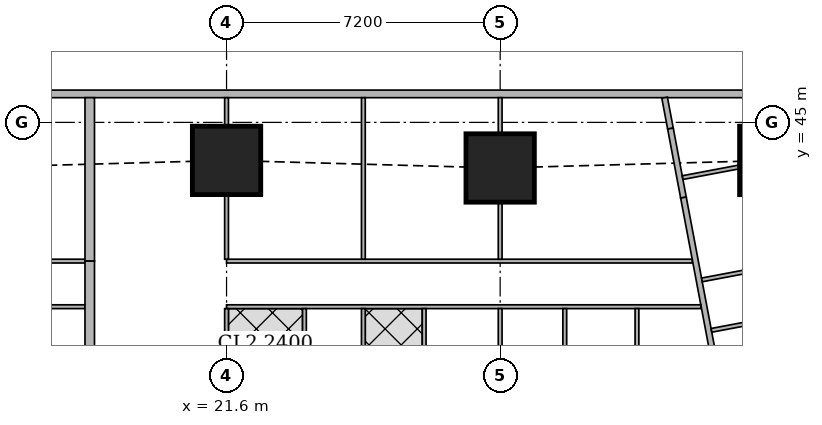
"""IFC4 building model, lengths in metres.
Left out: names, types, materials, properties, quantities, classifications, styles, units other than length and angle.
Written with IfcOpenShell. Run it as: python <this file> out.ifc"""

import sys

from ifc_helpers import new_model, si_unit, direction, frame, frame_2d, origin, origin_2d, place, context, subcontext, project, spatial, rectangle, extrude, element, fill, save


model = new_model("IFC4")
c1 = context("Model", 3, precision=1e-05, world=origin(), true_north=direction((0.0, 1.0)))
c2 = subcontext(c1, "Body", "Model", "MODEL_VIEW")
j1 = project(units=[si_unit("LENGTHUNIT", "METRE"), si_unit("PLANEANGLEUNIT", "RADIAN")], contexts=[c1])
p1 = place(None, origin())
s1 = spatial("IfcSite", under=j1, at=p1, CompositionType="ELEMENT")
p2 = place(p1, origin())
s2 = spatial("IfcBuilding", under=s1, at=p2, CompositionType="ELEMENT")
p3 = place(p2, frame((0.0, 0.0, 139.55)))
s3 = spatial("IfcBuildingStorey", under=s2, at=p3, CompositionType="ELEMENT", Elevation=139.55)
for number, where, z_axis, x_axis in (
    (1, (21.6, 44.0, 0.0), (0.0, 0.0, 1.0), (1.0, 0.0, 0.0)),
    (2, (28.8, 43.8, 0.0), (0.0, 0.0, 1.0), (1.0, 0.0, 0.0)),
    (3, (36.0, 44.0, 0.0), (0.0, 0.0, 1.0), (1.0, 0.0, 0.0)),
):
    element("IfcColumn", number, at=place(p3, frame(where, z_axis=z_axis, x_axis=x_axis)), inside=s3, PredefinedType="COLUMN", context=c2, shape_type="SweptSolid", body=[
        extrude(rectangle(XDim=1.8, YDim=1.8, at=origin_2d()), origin(), (0.0, 0.0, 1.0), 3.75),
    ])
p4 = place(p3, frame((40.106, 45.75, 0.0), z_axis=(0.0, 0.0, 1.0), x_axis=(-1.0, 0.0, 0.0)))
e4 = element("IfcWall", 4, at=p4, inside=s3, PredefinedType="SOLIDWALL", context=c2, shape_type="SweptSolid", body=[
    extrude(rectangle(XDim=37.943, YDim=0.2, at=frame_2d((18.971, 0.0))), origin(), (0.0, 0.0, 1.0), 3.5),
])
p5 = place(p4, frame((8.606, 0.0, 0.9)))
e5 = element("IfcOpeningElement", 5, at=p5, cuts=e4, PredefinedType="OPENING", context=c2, shape_type="SweptSolid", body=[
    extrude(rectangle(XDim=1.8, YDim=1.5, at=frame_2d((0.9, 0.75))), frame((0.0, 0.11, 0.0), z_axis=(0.0, -1.0, 0.0), x_axis=(1.0, 0.0, 0.0)), (0.0, 0.0, 1.0), 0.22),
])
p6 = place(p4, frame((12.206, 0.0, 0.9)))
e6 = element("IfcOpeningElement", 6, at=p6, cuts=e4, PredefinedType="OPENING", context=c2, shape_type="SweptSolid", body=[
    extrude(rectangle(XDim=1.8, YDim=1.5, at=frame_2d((0.9, 0.75))), frame((0.0, 0.11, 0.0), z_axis=(0.0, -1.0, 0.0), x_axis=(1.0, 0.0, 0.0)), (0.0, 0.0, 1.0), 0.22),
])
p7 = place(p4, frame((15.806, 0.0, 0.9)))
e7 = element("IfcOpeningElement", 7, at=p7, cuts=e4, PredefinedType="OPENING", context=c2, shape_type="SweptSolid", body=[
    extrude(rectangle(XDim=1.8, YDim=1.5, at=frame_2d((0.9, 0.75))), frame((0.0, 0.11, 0.0), z_axis=(0.0, -1.0, 0.0), x_axis=(1.0, 0.0, 0.0)), (0.0, 0.0, 1.0), 0.22),
])
p8 = place(p4, frame((19.406, 0.0, 0.9)))
e8 = element("IfcOpeningElement", 8, at=p8, cuts=e4, PredefinedType="OPENING", context=c2, shape_type="SweptSolid", body=[
    extrude(rectangle(XDim=1.8, YDim=1.5, at=frame_2d((0.9, 0.75))), frame((0.0, 0.11, 0.0), z_axis=(0.0, -1.0, 0.0), x_axis=(1.0, 0.0, 0.0)), (0.0, 0.0, 1.0), 0.22),
])
p9 = place(p4, frame((23.006, 0.0, 0.9)))
e9 = element("IfcOpeningElement", 9, at=p9, cuts=e4, PredefinedType="OPENING", context=c2, shape_type="SweptSolid", body=[
    extrude(rectangle(XDim=1.8, YDim=1.5, at=frame_2d((0.9, 0.75))), frame((0.0, 0.11, 0.0), z_axis=(0.0, -1.0, 0.0), x_axis=(1.0, 0.0, 0.0)), (0.0, 0.0, 1.0), 0.22),
])
p10 = place(p4, frame((26.606, 0.0, 0.9)))
e10 = element("IfcOpeningElement", 10, at=p10, cuts=e4, PredefinedType="OPENING", context=c2, shape_type="SweptSolid", body=[
    extrude(rectangle(XDim=1.8, YDim=1.5, at=frame_2d((0.9, 0.75))), frame((0.0, 0.11, 0.0), z_axis=(0.0, -1.0, 0.0), x_axis=(1.0, 0.0, 0.0)), (0.0, 0.0, 1.0), 0.22),
])
p11 = place(p3, frame((33.127, 45.65, 0.0), z_axis=(0.0, 0.0, 1.0), x_axis=(0.186176514576, -0.982516313056, 0.0)))
e11 = element("IfcWall", 11, at=p11, inside=s3, PredefinedType="SOLIDWALL", context=c2, shape_type="SweptSolid", body=[
    extrude(rectangle(XDim=0.827, YDim=0.15, at=frame_2d((0.414, 0.0))), origin(), (0.0, 0.0, 1.0), 3.5),
])
p12 = place(p3, frame((33.281, 44.837, 0.0), z_axis=(0.0, 0.0, 1.0), x_axis=(0.185198323004, -0.982701165745, 0.0)))
e12 = element("IfcWall", 12, at=p12, inside=s3, PredefinedType="SOLIDWALL", context=c2, shape_type="SweptSolid", body=[
    extrude(rectangle(XDim=1.847, YDim=0.15, at=frame_2d((0.923, 0.0))), origin(), (0.0, 0.0, 1.0), 2.1),
])
p13 = place(p3, frame((33.623, 43.022, 0.0), z_axis=(0.0, 0.0, 1.0), x_axis=(0.185596841028, -0.98262597798, 0.0)))
e13 = element("IfcWall", 13, at=p13, inside=s3, PredefinedType="SOLIDWALL", context=c2, shape_type="SweptSolid", body=[
    extrude(rectangle(XDim=41.66, YDim=0.15, at=frame_2d((20.83, 0.0))), origin(), (0.0, 0.0, 1.0), 2.5),
])
p14 = place(p13, frame((20.242, 0.0, 0.0)))
e14 = element("IfcOpeningElement", 14, at=p14, cuts=e13, PredefinedType="OPENING", context=c2, shape_type="SweptSolid", body=[
    extrude(rectangle(XDim=1.0, YDim=2.1, at=frame_2d((0.5, 1.05))), frame((0.0, 0.085, 0.0), z_axis=(0.0, -1.0, 0.0), x_axis=(1.0, 0.0, 0.0)), (0.0, 0.0, 1.0), 0.17),
])
p15 = place(p13, frame((24.714, 0.0, 0.0)))
e15 = element("IfcOpeningElement", 15, at=p15, cuts=e13, PredefinedType="OPENING", context=c2, shape_type="SweptSolid", body=[
    extrude(rectangle(XDim=1.0, YDim=2.1, at=frame_2d((0.5, 1.05))), frame((0.0, 0.085, 0.0), z_axis=(0.0, -1.0, 0.0), x_axis=(1.0, 0.0, 0.0)), (0.0, 0.0, 1.0), 0.17),
])
p16 = place(p13, frame((31.206, 0.0, 0.0)))
e16 = element("IfcOpeningElement", 16, at=p16, cuts=e13, PredefinedType="OPENING", context=c2, shape_type="SweptSolid", body=[
    extrude(rectangle(XDim=1.0, YDim=2.1, at=frame_2d((0.5, 1.05))), frame((0.0, 0.085, 0.0), z_axis=(0.0, -1.0, 0.0), x_axis=(1.0, 0.0, 0.0)), (0.0, 0.0, 1.0), 0.17),
])
p17 = place(p3, frame((35.09, 43.828, 0.0), z_axis=(0.0, 0.0, 1.0), x_axis=(-0.982683801717, -0.185290436461, 0.0)))
e17 = element("IfcWall", 17, at=p17, inside=s3, PredefinedType="PARTITIONING", context=c2, shape_type="SweptSolid", body=[
    extrude(rectangle(XDim=1.515, YDim=0.1, at=frame_2d((0.758, 0.0))), origin(), (0.0, 0.0, 1.0), 2.1),
])
p18 = place(p3, frame((37.824, 40.182, 0.0), z_axis=(0.0, 0.0, 1.0), x_axis=(-0.982648794755, -0.185475998897, 0.0)))
e18 = element("IfcWall", 18, at=p18, inside=s3, PredefinedType="PARTITIONING", context=c2, shape_type="SweptSolid", body=[
    extrude(rectangle(XDim=3.525, YDim=0.1, at=frame_2d((1.763, 0.0))), origin(), (0.0, 0.0, 1.0), 3.5),
])
p19 = place(p3, frame((14.4, 41.35, 0.0), z_axis=(0.0, 0.0, 1.0), x_axis=(1.0, 0.0, 0.0)))
e19 = element("IfcWall", 19, at=p19, inside=s3, PredefinedType="PARTITIONING", context=c2, shape_type="SweptSolid", body=[
    extrude(rectangle(XDim=3.475, YDim=0.1, at=frame_2d((1.738, 0.0))), origin(), (0.0, 0.0, 1.0), 3.5),
])
p20 = place(p19, frame((0.2, 0.0, 0.0)))
e20 = element("IfcOpeningElement", 20, at=p20, cuts=e19, PredefinedType="OPENING", context=c2, shape_type="SweptSolid", body=[
    extrude(rectangle(XDim=0.9, YDim=2.1, at=frame_2d((0.45, 1.05))), frame((0.0, 0.06, 0.0), z_axis=(0.0, -1.0, 0.0), x_axis=(1.0, 0.0, 0.0)), (0.0, 0.0, 1.0), 0.12),
])
p21 = place(p3, frame((14.4, 40.15, 0.0), z_axis=(0.0, 0.0, 1.0), x_axis=(1.0, 0.0, 0.0)))
e21 = element("IfcWall", 21, at=p21, inside=s3, PredefinedType="PARTITIONING", context=c2, shape_type="SweptSolid", body=[
    extrude(rectangle(XDim=3.475, YDim=0.1, at=frame_2d((1.738, 0.0))), origin(), (0.0, 0.0, 1.0), 3.5),
])
p22 = place(p21, frame((0.575, 0.0, 0.0)))
e22 = element("IfcOpeningElement", 22, at=p22, cuts=e21, PredefinedType="OPENING", context=c2, shape_type="SweptSolid", body=[
    extrude(rectangle(XDim=0.9, YDim=2.1, at=frame_2d((0.45, 1.05))), frame((0.0, 0.06, 0.0), z_axis=(0.0, -1.0, 0.0), x_axis=(1.0, 0.0, 0.0)), (0.0, 0.0, 1.0), 0.12),
])
p23 = place(p21, frame((2.375, 0.0, 0.0)))
e23 = element("IfcOpeningElement", 23, at=p23, cuts=e21, PredefinedType="OPENING", context=c2, shape_type="SweptSolid", body=[
    extrude(rectangle(XDim=0.9, YDim=2.1, at=frame_2d((0.45, 1.05))), frame((0.0, 0.06, 0.0), z_axis=(0.0, -1.0, 0.0), x_axis=(1.0, 0.0, 0.0)), (0.0, 0.0, 1.0), 0.12),
])
p24 = place(p3, frame((21.6, 41.35, 0.0), z_axis=(0.0, 0.0, 1.0), x_axis=(1.0, 0.0, 0.0)))
e24 = element("IfcWall", 24, at=p24, inside=s3, PredefinedType="PARTITIONING", context=c2, shape_type="SweptSolid", body=[
    extrude(rectangle(XDim=12.253, YDim=0.1, at=frame_2d((6.126, 0.0))), origin(), (0.0, 0.0, 1.0), 3.5),
])
p25 = place(p24, frame((0.2, 0.0, 0.0)))
e25 = element("IfcOpeningElement", 25, at=p25, cuts=e24, PredefinedType="OPENING", context=c2, shape_type="SweptSolid", body=[
    extrude(rectangle(XDim=0.9, YDim=2.1, at=frame_2d((0.45, 1.05))), frame((0.0, 0.06, 0.0), z_axis=(0.0, -1.0, 0.0), x_axis=(1.0, 0.0, 0.0)), (0.0, 0.0, 1.0), 0.12),
])
p26 = place(p24, frame((3.8, 0.0, 0.0)))
e26 = element("IfcOpeningElement", 26, at=p26, cuts=e24, PredefinedType="OPENING", context=c2, shape_type="SweptSolid", body=[
    extrude(rectangle(XDim=0.9, YDim=2.1, at=frame_2d((0.45, 1.05))), frame((0.0, 0.06, 0.0), z_axis=(0.0, -1.0, 0.0), x_axis=(1.0, 0.0, 0.0)), (0.0, 0.0, 1.0), 0.12),
])
p27 = place(p24, frame((7.4, 0.0, 0.0)))
e27 = element("IfcOpeningElement", 27, at=p27, cuts=e24, PredefinedType="OPENING", context=c2, shape_type="SweptSolid", body=[
    extrude(rectangle(XDim=0.9, YDim=2.1, at=frame_2d((0.45, 1.05))), frame((0.0, 0.06, 0.0), z_axis=(0.0, -1.0, 0.0), x_axis=(1.0, 0.0, 0.0)), (0.0, 0.0, 1.0), 0.12),
])
p28 = place(p3, frame((21.6, 40.15, 0.0), z_axis=(0.0, 0.0, 1.0), x_axis=(1.0, 0.0, 0.0)))
e28 = element("IfcWall", 28, at=p28, inside=s3, PredefinedType="PARTITIONING", context=c2, shape_type="SweptSolid", body=[
    extrude(rectangle(XDim=12.48, YDim=0.1, at=frame_2d((6.24, 0.0))), origin(), (0.0, 0.0, 1.0), 3.5),
])
p29 = place(p28, frame((0.575, 0.0, 0.0)))
e29 = element("IfcOpeningElement", 29, at=p29, cuts=e28, PredefinedType="OPENING", context=c2, shape_type="SweptSolid", body=[
    extrude(rectangle(XDim=0.9, YDim=2.1, at=frame_2d((0.45, 1.05))), frame((0.0, 0.06, 0.0), z_axis=(0.0, -1.0, 0.0), x_axis=(1.0, 0.0, 0.0)), (0.0, 0.0, 1.0), 0.12),
])
p30 = place(p28, frame((3.95, 0.0, 0.0)))
e30 = element("IfcOpeningElement", 30, at=p30, cuts=e28, PredefinedType="OPENING", context=c2, shape_type="SweptSolid", body=[
    extrude(rectangle(XDim=0.9, YDim=2.1, at=frame_2d((0.45, 1.05))), frame((0.0, 0.06, 0.0), z_axis=(0.0, -1.0, 0.0), x_axis=(1.0, 0.0, 0.0)), (0.0, 0.0, 1.0), 0.12),
])
p31 = place(p28, frame((7.6, 0.0, 0.0)))
e31 = element("IfcOpeningElement", 31, at=p31, cuts=e28, PredefinedType="OPENING", context=c2, shape_type="SweptSolid", body=[
    extrude(rectangle(XDim=0.9, YDim=2.1, at=frame_2d((0.45, 1.05))), frame((0.0, 0.06, 0.0), z_axis=(0.0, -1.0, 0.0), x_axis=(1.0, 0.0, 0.0)), (0.0, 0.0, 1.0), 0.12),
])
p32 = place(p28, frame((11.43, 0.0, 0.0)))
e32 = element("IfcOpeningElement", 32, at=p32, cuts=e28, PredefinedType="OPENING", context=c2, shape_type="SweptSolid", body=[
    extrude(rectangle(XDim=0.9, YDim=2.1, at=frame_2d((0.45, 1.05))), frame((0.0, 0.06, 0.0), z_axis=(0.0, -1.0, 0.0), x_axis=(1.0, 0.0, 0.0)), (0.0, 0.0, 1.0), 0.12),
])
p33 = place(p28, frame((2.375, 0.0, 0.0)))
e33 = element("IfcOpeningElement", 33, at=p33, cuts=e28, PredefinedType="OPENING", context=c2, shape_type="SweptSolid", body=[
    extrude(rectangle(XDim=0.9, YDim=2.1, at=frame_2d((0.45, 1.05))), frame((0.0, 0.06, 0.0), z_axis=(0.0, -1.0, 0.0), x_axis=(1.0, 0.0, 0.0)), (0.0, 0.0, 1.0), 0.12),
])
p34 = place(p28, frame((5.75, 0.0, 0.0)))
e34 = element("IfcOpeningElement", 34, at=p34, cuts=e28, PredefinedType="OPENING", context=c2, shape_type="SweptSolid", body=[
    extrude(rectangle(XDim=0.9, YDim=2.1, at=frame_2d((0.45, 1.05))), frame((0.0, 0.06, 0.0), z_axis=(0.0, -1.0, 0.0), x_axis=(1.0, 0.0, 0.0)), (0.0, 0.0, 1.0), 0.12),
])
p35 = place(p28, frame((9.4, 0.0, 0.0)))
e35 = element("IfcOpeningElement", 35, at=p35, cuts=e28, PredefinedType="OPENING", context=c2, shape_type="SweptSolid", body=[
    extrude(rectangle(XDim=0.9, YDim=2.1, at=frame_2d((0.45, 1.05))), frame((0.0, 0.06, 0.0), z_axis=(0.0, -1.0, 0.0), x_axis=(1.0, 0.0, 0.0)), (0.0, 0.0, 1.0), 0.12),
])
p36 = place(p3, frame((21.6, 41.4, 0.0), z_axis=(0.0, 0.0, 1.0), x_axis=(0.0, 1.0, 0.0)))
e36 = element("IfcWall", 36, at=p36, inside=s3, PredefinedType="PARTITIONING", context=c2, shape_type="SweptSolid", body=[
    extrude(rectangle(XDim=1.699, YDim=0.1, at=frame_2d((0.85, 0.0))), origin(), (0.0, 0.0, 1.0), 3.5),
])
p37 = place(p3, frame((21.6, 44.901, 0.0), z_axis=(0.0, 0.0, 1.0), x_axis=(0.0, 1.0, 0.0)))
e37 = element("IfcWall", 37, at=p37, inside=s3, PredefinedType="PARTITIONING", context=c2, shape_type="SweptSolid", body=[
    extrude(rectangle(XDim=0.749, YDim=0.1, at=frame_2d((0.375, 0.0))), origin(), (0.0, 0.0, 1.0), 3.5),
])
p38 = place(p3, frame((25.2, 41.4, 0.0), z_axis=(0.0, 0.0, 1.0), x_axis=(0.0, 1.0, 0.0)))
e38 = element("IfcWall", 38, at=p38, inside=s3, PredefinedType="PARTITIONING", context=c2, shape_type="SweptSolid", body=[
    extrude(rectangle(XDim=4.25, YDim=0.1, at=frame_2d((2.125, 0.0))), origin(), (0.0, 0.0, 1.0), 2.1),
])
p39 = place(p3, frame((28.8, 41.4, 0.0), z_axis=(0.0, 0.0, 1.0), x_axis=(0.0, 1.0, 0.0)))
e39 = element("IfcWall", 39, at=p39, inside=s3, PredefinedType="PARTITIONING", context=c2, shape_type="SweptSolid", body=[
    extrude(rectangle(XDim=1.499, YDim=0.1, at=frame_2d((0.75, 0.0))), origin(), (0.0, 0.0, 1.0), 3.5),
])
p40 = place(p3, frame((28.8, 44.701, 0.0), z_axis=(0.0, 0.0, 1.0), x_axis=(0.0, 1.0, 0.0)))
e40 = element("IfcWall", 40, at=p40, inside=s3, PredefinedType="PARTITIONING", context=c2, shape_type="SweptSolid", body=[
    extrude(rectangle(XDim=0.949, YDim=0.1, at=frame_2d((0.475, 0.0))), origin(), (0.0, 0.0, 1.0), 3.5),
])
p41 = place(p3, frame((21.6, 38.251, 0.0), z_axis=(0.0, 0.0, 1.0), x_axis=(0.0, 1.0, 0.0)))
e41 = element("IfcWall", 41, at=p41, inside=s3, PredefinedType="PARTITIONING", context=c2, shape_type="SweptSolid", body=[
    extrude(rectangle(XDim=1.849, YDim=0.1, at=frame_2d((0.925, 0.0))), origin(), (0.0, 0.0, 1.0), 3.5),
])
p42 = place(p3, frame((25.2, 36.575, 0.0), z_axis=(0.0, 0.0, 1.0), x_axis=(0.0, 1.0, 0.0)))
e42 = element("IfcWall", 42, at=p42, inside=s3, PredefinedType="PARTITIONING", context=c2, shape_type="SweptSolid", body=[
    extrude(rectangle(XDim=3.525, YDim=0.1, at=frame_2d((1.763, 0.0))), origin(), (0.0, 0.0, 1.0), 3.5),
])
p43 = place(p3, frame((28.8, 38.251, 0.0), z_axis=(0.0, 0.0, 1.0), x_axis=(0.0, 1.0, 0.0)))
e43 = element("IfcWall", 43, at=p43, inside=s3, PredefinedType="PARTITIONING", context=c2, shape_type="SweptSolid", body=[
    extrude(rectangle(XDim=1.849, YDim=0.1, at=frame_2d((0.925, 0.0))), origin(), (0.0, 0.0, 1.0), 3.5),
])
for number, where, z_axis, x_axis in (
    (44, (32.4, 36.575, 0.0), (0.0, 0.0, 1.0), (0.0, 1.0, 0.0)),
    (45, (23.65, 36.575, 0.0), (0.0, 0.0, 1.0), (0.0, 1.0, 0.0)),
    (46, (26.8, 36.575, 0.0), (0.0, 0.0, 1.0), (0.0, 1.0, 0.0)),
    (47, (30.5, 36.575, 0.0), (0.0, 0.0, 1.0), (0.0, 1.0, 0.0)),
):
    element("IfcWall", number, at=place(p3, frame(where, z_axis=z_axis, x_axis=x_axis)), inside=s3, PredefinedType="PARTITIONING", context=c2, shape_type="SweptSolid", body=[
        extrude(rectangle(XDim=3.525, YDim=0.1, at=frame_2d((1.763, 0.0))), origin(), (0.0, 0.0, 1.0), 3.5),
    ])
p44 = place(p3, frame((18.0, 41.35, 0.0), z_axis=(0.0, 0.0, 1.0), x_axis=(0.0, 1.0, 0.0)))
e48 = element("IfcWall", 48, at=p44, inside=s3, PredefinedType="SOLIDWALL", context=c2, shape_type="SweptSolid", body=[
    extrude(rectangle(XDim=4.3, YDim=0.25, at=frame_2d((2.15, 0.0))), origin(), (0.0, 0.0, 1.0), 2.1),
])
p45 = place(p3, frame((18.0, 36.575, 0.0), z_axis=(0.0, 0.0, 1.0), x_axis=(0.0, 1.0, 0.0)))
e49 = element("IfcWall", 49, at=p45, inside=s3, PredefinedType="SOLIDWALL", context=c2, shape_type="SweptSolid", body=[
    extrude(rectangle(XDim=4.775, YDim=0.25, at=frame_2d((2.388, 0.0))), origin(), (0.0, 0.0, 1.0), 3.5),
])
p46 = place(p3, frame((37.573, 41.509, 0.0), z_axis=(0.0, 0.0, 1.0), x_axis=(-0.982638553676, -0.185530247748, 0.0)))
e50 = element("IfcWall", 50, at=p46, inside=s3, PredefinedType="PARTITIONING", context=c2, shape_type="SweptSolid", body=[
    extrude(rectangle(XDim=3.525, YDim=0.1, at=frame_2d((1.763, 0.0))), origin(), (0.0, 0.0, 1.0), 3.5),
])
p47 = place(p46, frame((1.325, 0.0, 0.0)))
e51 = element("IfcOpeningElement", 51, at=p47, cuts=e50, PredefinedType="OPENING", context=c2, shape_type="SweptSolid", body=[
    extrude(rectangle(XDim=0.9, YDim=2.1, at=frame_2d((0.45, 1.05))), frame((0.0, 0.06, 0.0), z_axis=(0.0, -1.0, 0.0), x_axis=(1.0, 0.0, 0.0)), (0.0, 0.0, 1.0), 0.12),
])
p48 = place(p5, origin())
e52 = element("IfcWindow", 52, at=p48, inside=s3, PartitioningType="SINGLE_PANEL", PredefinedType="WINDOW", context=c2, shape_type="SweptSolid", body=[
    extrude(rectangle(XDim=1.8, YDim=1.5, at=frame_2d((0.9, 0.75))), frame((0.0, 0.03, 0.0), z_axis=(0.0, -1.0, 0.0), x_axis=(1.0, 0.0, 0.0)), (0.0, 0.0, 1.0), 0.06),
])
fill(e5, e52)
p49 = place(p6, origin())
e53 = element("IfcWindow", 53, at=p49, inside=s3, PartitioningType="SINGLE_PANEL", PredefinedType="WINDOW", context=c2, shape_type="SweptSolid", body=[
    extrude(rectangle(XDim=1.8, YDim=1.5, at=frame_2d((0.9, 0.75))), frame((0.0, 0.03, 0.0), z_axis=(0.0, -1.0, 0.0), x_axis=(1.0, 0.0, 0.0)), (0.0, 0.0, 1.0), 0.06),
])
fill(e6, e53)
p50 = place(p7, origin())
e54 = element("IfcWindow", 54, at=p50, inside=s3, PartitioningType="SINGLE_PANEL", PredefinedType="WINDOW", context=c2, shape_type="SweptSolid", body=[
    extrude(rectangle(XDim=1.8, YDim=1.5, at=frame_2d((0.9, 0.75))), frame((0.0, 0.03, 0.0), z_axis=(0.0, -1.0, 0.0), x_axis=(1.0, 0.0, 0.0)), (0.0, 0.0, 1.0), 0.06),
])
fill(e7, e54)
p51 = place(p8, origin())
e55 = element("IfcWindow", 55, at=p51, inside=s3, PartitioningType="SINGLE_PANEL", PredefinedType="WINDOW", context=c2, shape_type="SweptSolid", body=[
    extrude(rectangle(XDim=1.8, YDim=1.5, at=frame_2d((0.9, 0.75))), frame((0.0, 0.03, 0.0), z_axis=(0.0, -1.0, 0.0), x_axis=(1.0, 0.0, 0.0)), (0.0, 0.0, 1.0), 0.06),
])
fill(e8, e55)
p52 = place(p9, origin())
e56 = element("IfcWindow", 56, at=p52, inside=s3, PartitioningType="SINGLE_PANEL", PredefinedType="WINDOW", context=c2, shape_type="SweptSolid", body=[
    extrude(rectangle(XDim=1.8, YDim=1.5, at=frame_2d((0.9, 0.75))), frame((0.0, 0.03, 0.0), z_axis=(0.0, -1.0, 0.0), x_axis=(1.0, 0.0, 0.0)), (0.0, 0.0, 1.0), 0.06),
])
fill(e9, e56)
p53 = place(p23, origin())
e57 = element("IfcDoor", 57, at=p53, inside=s3, OperationType="SINGLE_SWING_LEFT", PredefinedType="DOOR", context=c2, shape_type="SweptSolid", body=[
    extrude(rectangle(XDim=0.9, YDim=2.1, at=frame_2d((0.45, 1.05))), frame((0.0, 0.025, 0.0), z_axis=(0.0, -1.0, 0.0), x_axis=(1.0, 0.0, 0.0)), (0.0, 0.0, 1.0), 0.05),
])
fill(e23, e57)
p54 = place(p25, origin())
e58 = element("IfcDoor", 58, at=p54, inside=s3, OperationType="SINGLE_SWING_LEFT", PredefinedType="DOOR", context=c2, shape_type="SweptSolid", body=[
    extrude(rectangle(XDim=0.9, YDim=2.1, at=frame_2d((0.45, 1.05))), frame((0.0, 0.025, 0.0), z_axis=(0.0, -1.0, 0.0), x_axis=(1.0, 0.0, 0.0)), (0.0, 0.0, 1.0), 0.05),
])
fill(e25, e58)
p55 = place(p26, origin())
e59 = element("IfcDoor", 59, at=p55, inside=s3, OperationType="SINGLE_SWING_LEFT", PredefinedType="DOOR", context=c2, shape_type="SweptSolid", body=[
    extrude(rectangle(XDim=0.9, YDim=2.1, at=frame_2d((0.45, 1.05))), frame((0.0, 0.025, 0.0), z_axis=(0.0, -1.0, 0.0), x_axis=(1.0, 0.0, 0.0)), (0.0, 0.0, 1.0), 0.05),
])
fill(e26, e59)
p56 = place(p27, origin())
e60 = element("IfcDoor", 60, at=p56, inside=s3, OperationType="SINGLE_SWING_LEFT", PredefinedType="DOOR", context=c2, shape_type="SweptSolid", body=[
    extrude(rectangle(XDim=0.9, YDim=2.1, at=frame_2d((0.45, 1.05))), frame((0.0, 0.025, 0.0), z_axis=(0.0, -1.0, 0.0), x_axis=(1.0, 0.0, 0.0)), (0.0, 0.0, 1.0), 0.05),
])
fill(e27, e60)
p57 = place(p29, origin())
e61 = element("IfcDoor", 61, at=p57, inside=s3, OperationType="SINGLE_SWING_RIGHT", PredefinedType="DOOR", context=c2, shape_type="SweptSolid", body=[
    extrude(rectangle(XDim=0.9, YDim=2.1, at=frame_2d((0.45, 1.05))), frame((0.0, 0.025, 0.0), z_axis=(0.0, -1.0, 0.0), x_axis=(1.0, 0.0, 0.0)), (0.0, 0.0, 1.0), 0.05),
])
fill(e29, e61)
p58 = place(p30, origin())
e62 = element("IfcDoor", 62, at=p58, inside=s3, OperationType="SINGLE_SWING_LEFT", PredefinedType="DOOR", context=c2, shape_type="SweptSolid", body=[
    extrude(rectangle(XDim=0.9, YDim=2.1, at=frame_2d((0.45, 1.05))), frame((0.0, 0.025, 0.0), z_axis=(0.0, -1.0, 0.0), x_axis=(1.0, 0.0, 0.0)), (0.0, 0.0, 1.0), 0.05),
])
fill(e30, e62)
p59 = place(p31, origin())
e63 = element("IfcDoor", 63, at=p59, inside=s3, OperationType="SINGLE_SWING_LEFT", PredefinedType="DOOR", context=c2, shape_type="SweptSolid", body=[
    extrude(rectangle(XDim=0.9, YDim=2.1, at=frame_2d((0.45, 1.05))), frame((0.0, 0.025, 0.0), z_axis=(0.0, -1.0, 0.0), x_axis=(1.0, 0.0, 0.0)), (0.0, 0.0, 1.0), 0.05),
])
fill(e31, e63)
p60 = place(p32, origin())
e64 = element("IfcDoor", 64, at=p60, inside=s3, OperationType="SINGLE_SWING_LEFT", PredefinedType="DOOR", context=c2, shape_type="SweptSolid", body=[
    extrude(rectangle(XDim=0.9, YDim=2.1, at=frame_2d((0.45, 1.05))), frame((0.0, 0.025, 0.0), z_axis=(0.0, -1.0, 0.0), x_axis=(1.0, 0.0, 0.0)), (0.0, 0.0, 1.0), 0.05),
])
fill(e32, e64)
p61 = place(p33, origin())
e65 = element("IfcDoor", 65, at=p61, inside=s3, OperationType="SINGLE_SWING_RIGHT", PredefinedType="DOOR", context=c2, shape_type="SweptSolid", body=[
    extrude(rectangle(XDim=0.9, YDim=2.1, at=frame_2d((0.45, 1.05))), frame((0.0, 0.025, 0.0), z_axis=(0.0, -1.0, 0.0), x_axis=(1.0, 0.0, 0.0)), (0.0, 0.0, 1.0), 0.05),
])
fill(e33, e65)
p62 = place(p34, origin())
e66 = element("IfcDoor", 66, at=p62, inside=s3, OperationType="SINGLE_SWING_RIGHT", PredefinedType="DOOR", context=c2, shape_type="SweptSolid", body=[
    extrude(rectangle(XDim=0.9, YDim=2.1, at=frame_2d((0.45, 1.05))), frame((0.0, 0.025, 0.0), z_axis=(0.0, -1.0, 0.0), x_axis=(1.0, 0.0, 0.0)), (0.0, 0.0, 1.0), 0.05),
])
fill(e34, e66)
p63 = place(p35, origin())
e67 = element("IfcDoor", 67, at=p63, inside=s3, OperationType="SINGLE_SWING_RIGHT", PredefinedType="DOOR", context=c2, shape_type="SweptSolid", body=[
    extrude(rectangle(XDim=0.9, YDim=2.1, at=frame_2d((0.45, 1.05))), frame((0.0, 0.025, 0.0), z_axis=(0.0, -1.0, 0.0), x_axis=(1.0, 0.0, 0.0)), (0.0, 0.0, 1.0), 0.05),
])
fill(e35, e67)
save(model, sys.argv[1])
